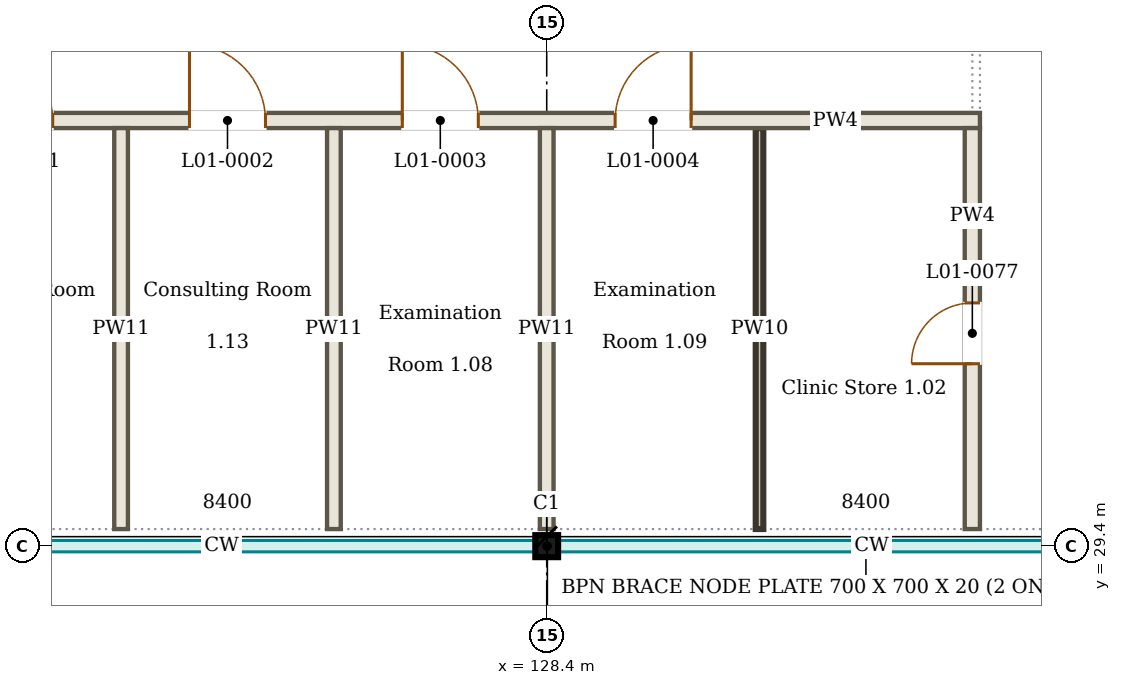
"""IFC4 building model, lengths in metres.
Left out: names, types, materials, properties, quantities, classifications, styles, units other than length and angle.
Written with IfcOpenShell. Run it as: python <this file> out.ifc"""

import sys

from ifc_helpers import new_model, si_unit, direction, frame, frame_2d, origin, origin_2d, place, context, subcontext, project, spatial, rectangle, i_section, extrude, element, fill, save


model = new_model("IFC4")
c1 = context("Model", 3, precision=1e-05, world=origin(), true_north=direction((0.0, 1.0)))
c2 = subcontext(c1, "Body", "Model", "MODEL_VIEW")
j1 = project(units=[si_unit("LENGTHUNIT", "METRE"), si_unit("PLANEANGLEUNIT", "RADIAN")], contexts=[c1])
p1 = place(None, origin())
s1 = spatial("IfcSite", under=j1, at=p1, CompositionType="ELEMENT")
p2 = place(p1, origin())
s2 = spatial("IfcBuilding", under=s1, at=p2, CompositionType="ELEMENT")
p3 = place(p2, frame((0.0, 0.0, 4.5)))
s3 = spatial("IfcBuildingStorey", under=s2, at=p3, CompositionType="ELEMENT", Elevation=4.5)
p4 = place(p3, frame((128.4, 29.4, 0.0), z_axis=(0.0, 0.0, 1.0), x_axis=(1.0, 0.0, 0.0)))
e1 = element("IfcColumn", 1, at=p4, inside=s3, PredefinedType="COLUMN", context=c2, shape_type="SweptSolid", body=[
    extrude(i_section(OverallWidth=0.3, OverallDepth=0.29, WebThickness=0.009, FlangeThickness=0.014, FilletRadius=0.027, at=origin_2d()), origin(), (0.0, 0.0, 1.0), 4.5),
])
p5 = place(p3, frame((120.0, 35.0, 0.0), z_axis=(0.0, 0.0, 1.0), x_axis=(1.0, 0.0, 0.0)))
e2 = element("IfcWall", 2, at=p5, inside=s3, PredefinedType="PARTITIONING", context=c2, shape_type="SweptSolid", body=[
    extrude(rectangle(XDim=14.1, YDim=0.2, at=frame_2d((7.05, 0.0))), origin(), (0.0, 0.0, 1.0), 3.9),
])
p6 = place(p5, frame((0.9, 0.0, 0.0)))
e3 = element("IfcOpeningElement", 3, at=p6, cuts=e2, PredefinedType="OPENING", context=c2, shape_type="SweptSolid", body=[
    extrude(rectangle(XDim=1.0, YDim=2.1, at=frame_2d((0.5, 1.05))), frame((0.0, 0.11, 0.0), z_axis=(0.0, -1.0, 0.0), x_axis=(1.0, 0.0, 0.0)), (0.0, 0.0, 1.0), 0.22),
])
p7 = place(p5, frame((3.7, 0.0, 0.0)))
e4 = element("IfcOpeningElement", 4, at=p7, cuts=e2, PredefinedType="OPENING", context=c2, shape_type="SweptSolid", body=[
    extrude(rectangle(XDim=1.0, YDim=2.1, at=frame_2d((0.5, 1.05))), frame((0.0, 0.11, 0.0), z_axis=(0.0, -1.0, 0.0), x_axis=(1.0, 0.0, 0.0)), (0.0, 0.0, 1.0), 0.22),
])
p8 = place(p5, frame((6.5, 0.0, 0.0)))
e5 = element("IfcOpeningElement", 5, at=p8, cuts=e2, PredefinedType="OPENING", context=c2, shape_type="SweptSolid", body=[
    extrude(rectangle(XDim=1.0, YDim=2.1, at=frame_2d((0.5, 1.05))), frame((0.0, 0.11, 0.0), z_axis=(0.0, -1.0, 0.0), x_axis=(1.0, 0.0, 0.0)), (0.0, 0.0, 1.0), 0.22),
])
p9 = place(p5, frame((9.3, 0.0, 0.0)))
e6 = element("IfcOpeningElement", 6, at=p9, cuts=e2, PredefinedType="OPENING", context=c2, shape_type="SweptSolid", body=[
    extrude(rectangle(XDim=1.0, YDim=2.1, at=frame_2d((0.5, 1.05))), frame((0.0, 0.11, 0.0), z_axis=(0.0, -1.0, 0.0), x_axis=(1.0, 0.0, 0.0)), (0.0, 0.0, 1.0), 0.22),
])
for number, where, z_axis, x_axis in (
    (7, (122.8, 29.625, 0.0), (0.0, 0.0, 1.0), (0.0, 1.0, 0.0)),
    (8, (125.6, 29.625, 0.0), (0.0, 0.0, 1.0), (0.0, 1.0, 0.0)),
):
    element("IfcWall", number, at=place(p3, frame(where, z_axis=z_axis, x_axis=x_axis)), inside=s3, PredefinedType="PARTITIONING", context=c2, shape_type="SweptSolid", body=[
        extrude(rectangle(XDim=5.275, YDim=0.18, at=frame_2d((2.637, 0.0))), origin(), (0.0, 0.0, 1.0), 3.996),
    ])
p10 = place(p3, frame((128.4, 29.625, 0.0), z_axis=(0.0, 0.0, 1.0), x_axis=(0.0, 1.0, 0.0)))
e9 = element("IfcWall", 9, at=p10, inside=s3, PredefinedType="PARTITIONING", context=c2, shape_type="SweptSolid", body=[
    extrude(rectangle(XDim=5.275, YDim=0.18, at=frame_2d((2.637, 0.0))), origin(), (0.0, 0.0, 1.0), 3.9),
])
p11 = place(p3, frame((131.2, 29.625, 0.0), z_axis=(0.0, 0.0, 1.0), x_axis=(0.0, 1.0, 0.0)))
e10 = element("IfcWall", 10, at=p11, inside=s3, PredefinedType="SOLIDWALL", context=c2, shape_type="SweptSolid", body=[
    extrude(rectangle(XDim=5.275, YDim=0.1, at=frame_2d((2.637, 0.0))), origin(), (0.0, 0.0, 1.0), 3.996),
])
p12 = place(p3, frame((134.0, 29.625, 0.0), z_axis=(0.0, 0.0, 1.0), x_axis=(0.0, 1.0, 0.0)))
e11 = element("IfcWall", 11, at=p12, inside=s3, PredefinedType="PARTITIONING", context=c2, shape_type="SweptSolid", body=[
    extrude(rectangle(XDim=5.275, YDim=0.2, at=frame_2d((2.637, 0.0))), origin(), (0.0, 0.0, 1.0), 3.996),
])
p13 = place(p12, frame((2.175, 0.0, 0.0)))
e12 = element("IfcOpeningElement", 12, at=p13, cuts=e11, PredefinedType="OPENING", context=c2, shape_type="SweptSolid", body=[
    extrude(rectangle(XDim=0.8, YDim=2.1, at=frame_2d((0.4, 1.05))), frame((0.0, 0.11, 0.0), z_axis=(0.0, -1.0, 0.0), x_axis=(1.0, 0.0, 0.0)), (0.0, 0.0, 1.0), 0.22),
])
p14 = place(p6, origin())
e13 = element("IfcDoor", 13, at=p14, inside=s3, OperationType="SINGLE_SWING_LEFT", PredefinedType="DOOR", context=c2, shape_type="SweptSolid", body=[
    extrude(rectangle(XDim=1.0, YDim=2.1, at=frame_2d((0.5, 1.05))), frame((0.0, 0.025, 0.0), z_axis=(0.0, -1.0, 0.0), x_axis=(1.0, 0.0, 0.0)), (0.0, 0.0, 1.0), 0.05),
])
fill(e3, e13)
p15 = place(p7, origin())
e14 = element("IfcDoor", 14, at=p15, inside=s3, OperationType="SINGLE_SWING_LEFT", PredefinedType="DOOR", context=c2, shape_type="SweptSolid", body=[
    extrude(rectangle(XDim=1.0, YDim=2.1, at=frame_2d((0.5, 1.05))), frame((0.0, 0.025, 0.0), z_axis=(0.0, -1.0, 0.0), x_axis=(1.0, 0.0, 0.0)), (0.0, 0.0, 1.0), 0.05),
])
fill(e4, e14)
p16 = place(p8, origin())
e15 = element("IfcDoor", 15, at=p16, inside=s3, OperationType="SINGLE_SWING_LEFT", PredefinedType="DOOR", context=c2, shape_type="SweptSolid", body=[
    extrude(rectangle(XDim=1.0, YDim=2.1, at=frame_2d((0.5, 1.05))), frame((0.0, 0.025, 0.0), z_axis=(0.0, -1.0, 0.0), x_axis=(1.0, 0.0, 0.0)), (0.0, 0.0, 1.0), 0.05),
])
fill(e5, e15)
p17 = place(p9, origin())
e16 = element("IfcDoor", 16, at=p17, inside=s3, OperationType="SINGLE_SWING_RIGHT", PredefinedType="DOOR", context=c2, shape_type="SweptSolid", body=[
    extrude(rectangle(XDim=1.0, YDim=2.1, at=frame_2d((0.5, 1.05))), frame((0.0, 0.025, 0.0), z_axis=(0.0, -1.0, 0.0), x_axis=(1.0, 0.0, 0.0)), (0.0, 0.0, 1.0), 0.05),
])
fill(e6, e16)
p18 = place(p13, origin())
e17 = element("IfcDoor", 17, at=p18, inside=s3, OperationType="SINGLE_SWING_LEFT", PredefinedType="DOOR", context=c2, shape_type="SweptSolid", body=[
    extrude(rectangle(XDim=0.8, YDim=2.1, at=frame_2d((0.4, 1.05))), frame((0.0, 0.025, 0.0), z_axis=(0.0, -1.0, 0.0), x_axis=(1.0, 0.0, 0.0)), (0.0, 0.0, 1.0), 0.05),
])
fill(e12, e17)
save(model, sys.argv[1])
